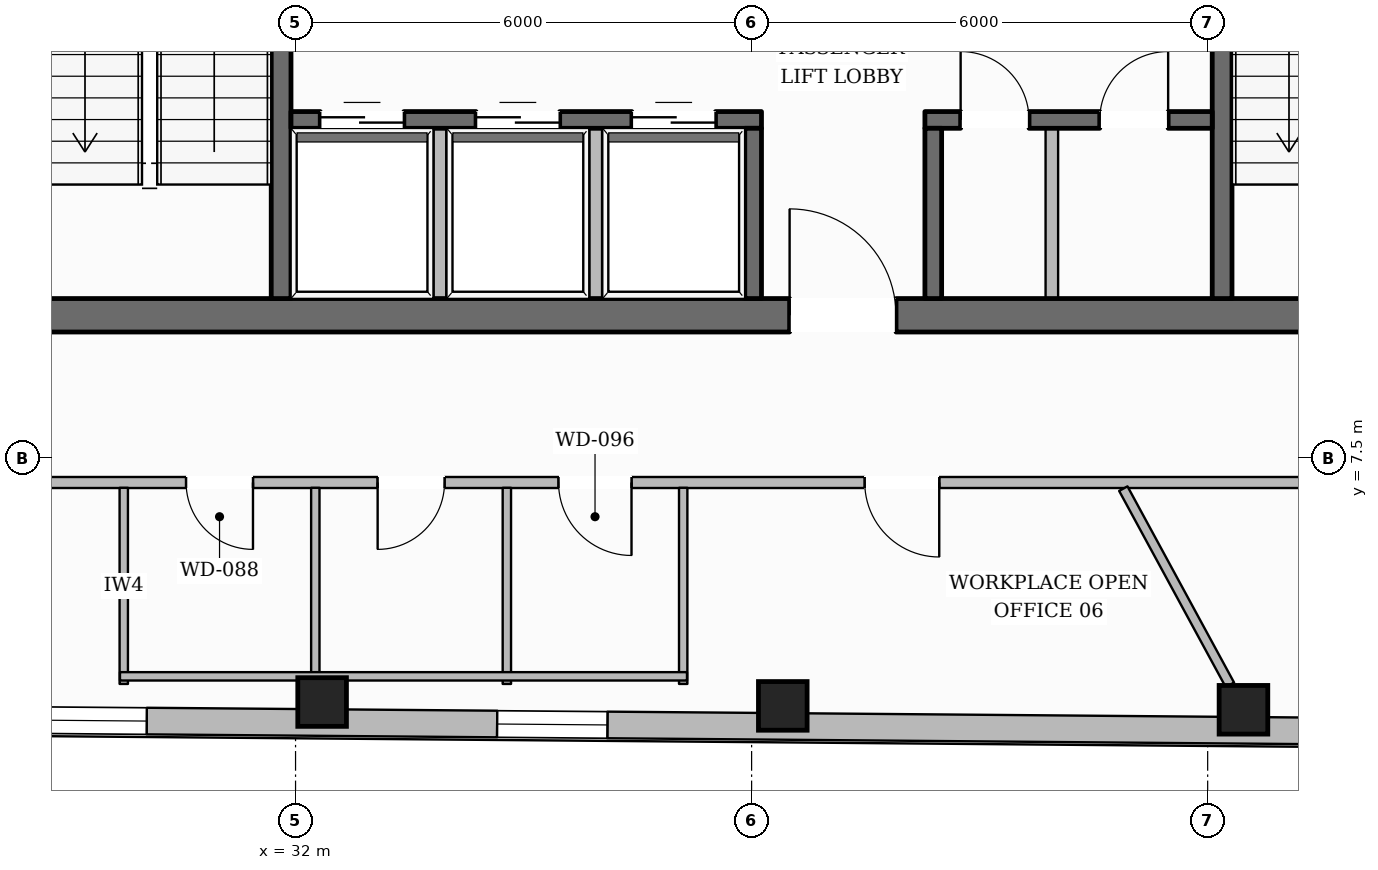
"""IFC4 building model, lengths in metres.
Left out: names, types, materials, properties, quantities, classifications, styles, units other than length and angle.
Written with IfcOpenShell. Run it as: python <this file> out.ifc"""

import sys

from ifc_helpers import new_model, si_unit, direction, frame, frame_2d, origin, origin_2d, place, context, subcontext, project, spatial, rectangle, hollow_rectangle, extrude, element, fill, save


model = new_model("IFC4")
c1 = context("Model", 3, precision=1e-05, world=origin(), true_north=direction((0.0, 1.0)))
c2 = subcontext(c1, "Body", "Model", "MODEL_VIEW")
j1 = project(units=[si_unit("LENGTHUNIT", "METRE"), si_unit("PLANEANGLEUNIT", "RADIAN")], contexts=[c1])
p1 = place(None, origin())
s1 = spatial("IfcSite", under=j1, at=p1, CompositionType="ELEMENT")
p2 = place(p1, origin())
s2 = spatial("IfcBuilding", under=s1, at=p2, CompositionType="ELEMENT")
p3 = place(p2, frame((0.0, 0.0, 176.55)))
s3 = spatial("IfcBuildingStorey", under=s2, at=p3, CompositionType="ELEMENT", Elevation=176.55)
p4 = place(p3, frame((28.04, 9.38, 0.0), z_axis=(0.0, 0.0, 1.0), x_axis=(1.0, 0.0, 0.0)))
e1 = element("IfcWall", 1, at=p4, inside=s3, PredefinedType="SOLIDWALL", context=c2, shape_type="SweptSolid", body=[
    extrude(rectangle(XDim=19.92, YDim=0.44, at=frame_2d((9.96, 0.0))), origin(), (0.0, 0.0, 1.0), 3.6),
])
p5 = place(p4, frame((10.46, 0.0, 0.0)))
e2 = element("IfcOpeningElement", 2, at=p5, cuts=e1, PredefinedType="OPENING", context=c2, shape_type="SweptSolid", body=[
    extrude(rectangle(XDim=1.4, YDim=2.2, at=frame_2d((0.7, 1.1))), frame((0.0, 0.23, 0.0), z_axis=(0.0, -1.0, 0.0), x_axis=(1.0, 0.0, 0.0)), (0.0, 0.0, 1.0), 0.46),
])
p6 = place(p3, frame((31.81, 9.6, 0.0), z_axis=(0.0, 0.0, 1.0), x_axis=(0.0, 1.0, 0.0)))
e3 = element("IfcWall", 3, at=p6, inside=s3, PredefinedType="SHEAR", context=c2, shape_type="SweptSolid", body=[
    extrude(rectangle(XDim=13.0, YDim=0.26, at=frame_2d((6.5, 0.0))), origin(), (0.0, 0.0, 1.0), 3.6),
])
p7 = place(p6, frame((10.925, 0.0, 0.0)))
e4 = element("IfcOpeningElement", 4, at=p7, cuts=e3, PredefinedType="OPENING", context=c2, shape_type="SweptSolid", body=[
    extrude(rectangle(XDim=1.25, YDim=2.25, at=frame_2d((0.625, 1.125))), frame((0.0, 0.14, 0.0), z_axis=(0.0, -1.0, 0.0), x_axis=(1.0, 0.0, 0.0)), (0.0, 0.0, 1.0), 0.28),
])
p8 = place(p3, frame((44.19, 9.6, 0.0), z_axis=(0.0, 0.0, 1.0), x_axis=(0.0, 1.0, 0.0)))
e5 = element("IfcWall", 5, at=p8, inside=s3, PredefinedType="SHEAR", context=c2, shape_type="SweptSolid", body=[
    extrude(rectangle(XDim=13.0, YDim=0.26, at=frame_2d((6.5, 0.0))), origin(), (0.0, 0.0, 1.0), 3.6),
])
p9 = place(p8, frame((10.925, 0.0, 0.0)))
e6 = element("IfcOpeningElement", 6, at=p9, cuts=e5, PredefinedType="OPENING", context=c2, shape_type="SweptSolid", body=[
    extrude(rectangle(XDim=1.25, YDim=2.25, at=frame_2d((0.625, 1.125))), frame((0.0, 0.14, 0.0), z_axis=(0.0, -1.0, 0.0), x_axis=(1.0, 0.0, 0.0)), (0.0, 0.0, 1.0), 0.28),
])
p10 = place(p3, frame((31.94, 11.95, 0.0), z_axis=(0.0, 0.0, 1.0), x_axis=(1.0, 0.0, 0.0)))
e7 = element("IfcWall", 7, at=p10, inside=s3, PredefinedType="SOLIDWALL", context=c2, shape_type="SweptSolid", body=[
    extrude(rectangle(XDim=6.19, YDim=0.22, at=frame_2d((3.095, 0.0))), origin(), (0.0, 0.0, 1.0), 3.6),
])
p11 = place(p10, frame((0.385, 0.0, 0.0)))
e8 = element("IfcOpeningElement", 8, at=p11, cuts=e7, PredefinedType="OPENING", context=c2, shape_type="SweptSolid", body=[
    extrude(rectangle(XDim=1.1, YDim=2.2, at=frame_2d((0.55, 1.1))), frame((0.0, 0.12, 0.0), z_axis=(0.0, -1.0, 0.0), x_axis=(1.0, 0.0, 0.0)), (0.0, 0.0, 1.0), 0.24),
])
p12 = place(p10, frame((2.435, 0.0, 0.0)))
e9 = element("IfcOpeningElement", 9, at=p12, cuts=e7, PredefinedType="OPENING", context=c2, shape_type="SweptSolid", body=[
    extrude(rectangle(XDim=1.1, YDim=2.2, at=frame_2d((0.55, 1.1))), frame((0.0, 0.12, 0.0), z_axis=(0.0, -1.0, 0.0), x_axis=(1.0, 0.0, 0.0)), (0.0, 0.0, 1.0), 0.24),
])
p13 = place(p10, frame((4.485, 0.0, 0.0)))
e10 = element("IfcOpeningElement", 10, at=p13, cuts=e7, PredefinedType="OPENING", context=c2, shape_type="SweptSolid", body=[
    extrude(rectangle(XDim=1.1, YDim=2.2, at=frame_2d((0.55, 1.1))), frame((0.0, 0.12, 0.0), z_axis=(0.0, -1.0, 0.0), x_axis=(1.0, 0.0, 0.0)), (0.0, 0.0, 1.0), 0.24),
])
p14 = place(p3, frame((40.28, 11.95, 0.0), z_axis=(0.0, 0.0, 1.0), x_axis=(1.0, 0.0, 0.0)))
e11 = element("IfcWall", 11, at=p14, inside=s3, PredefinedType="SOLIDWALL", context=c2, shape_type="SweptSolid", body=[
    extrude(rectangle(XDim=3.78, YDim=0.22, at=frame_2d((1.89, 0.0))), origin(), (0.0, 0.0, 1.0), 3.6),
])
p15 = place(p14, frame((0.47, 0.0, 0.0)))
e12 = element("IfcOpeningElement", 12, at=p15, cuts=e11, PredefinedType="OPENING", context=c2, shape_type="SweptSolid", body=[
    extrude(rectangle(XDim=0.9, YDim=2.1, at=frame_2d((0.45, 1.05))), frame((0.0, 0.12, 0.0), z_axis=(0.0, -1.0, 0.0), x_axis=(1.0, 0.0, 0.0)), (0.0, 0.0, 1.0), 0.24),
])
p16 = place(p14, frame((2.3, 0.0, 0.0)))
e13 = element("IfcOpeningElement", 13, at=p16, cuts=e11, PredefinedType="OPENING", context=c2, shape_type="SweptSolid", body=[
    extrude(rectangle(XDim=0.9, YDim=2.1, at=frame_2d((0.45, 1.05))), frame((0.0, 0.12, 0.0), z_axis=(0.0, -1.0, 0.0), x_axis=(1.0, 0.0, 0.0)), (0.0, 0.0, 1.0), 0.24),
])
for number, where, z_axis, x_axis in (
    (14, (38.02, 9.6, 0.0), (0.0, 0.0, 1.0), (0.0, 1.0, 0.0)),
    (15, (40.39, 9.6, 0.0), (0.0, 0.0, 1.0), (0.0, 1.0, 0.0)),
):
    element("IfcWall", number, at=place(p3, frame(where, z_axis=z_axis, x_axis=x_axis)), inside=s3, PredefinedType="SOLIDWALL", context=c2, shape_type="SweptSolid", body=[
        extrude(rectangle(XDim=2.24, YDim=0.22, at=frame_2d((1.12, 0.0))), origin(), (0.0, 0.0, 1.0), 3.6),
    ])
for number, where, z_axis, x_axis in (
    (16, (32.35, 4.292, 0.0), (0.0, 0.0, 1.0), (1.0, 0.0, 0.0)),
    (17, (38.41, 4.241, 0.0), (0.0, 0.0, 1.0), (1.0, 0.0, 0.0)),
    (18, (44.471, 4.19, 0.0), (0.0, 0.0, 1.0), (1.0, 0.0, 0.0)),
):
    element("IfcColumn", number, at=place(p3, frame(where, z_axis=z_axis, x_axis=x_axis)), inside=s3, PredefinedType="COLUMN", context=c2, shape_type="SweptSolid", body=[
        extrude(hollow_rectangle(XDim=0.64, YDim=0.64, WallThickness=0.028, at=origin_2d()), origin(), (0.0, 0.0, 1.0), 3.6),
    ])
p17 = place(p3, frame((15.13, 12.109, 0.0), z_axis=(0.0, 0.0, 1.0), x_axis=(0.493717133856, 0.869622557054, 0.0)))
e19 = element("IfcWall", 19, at=p17, inside=s3, PredefinedType="STANDARD", context=c2, shape_type="SweptSolid", body=[
    extrude(rectangle(XDim=37.245, YDim=0.35, at=frame_2d((18.623, 0.0))), origin(), (0.0, 0.0, 1.0), 3.132),
])
p18 = place(p17, frame((27.334, 0.0, 0.0)))
e20 = element("IfcOpeningElement", 20, at=p18, cuts=e19, PredefinedType="OPENING", context=c2, shape_type="SweptSolid", body=[
    extrude(rectangle(XDim=1.0, YDim=2.2, at=frame_2d((0.5, 1.1))), frame((0.0, 0.185, 0.0), z_axis=(0.0, -1.0, 0.0), x_axis=(1.0, 0.0, 0.0)), (0.0, 0.0, 1.0), 0.37),
])
p19 = place(p17, frame((33.014, 0.0, 0.65)))
e21 = element("IfcOpeningElement", 21, at=p19, cuts=e19, PredefinedType="OPENING", context=c2, shape_type="SweptSolid", body=[
    extrude(rectangle(XDim=1.45, YDim=1.75, at=frame_2d((0.725, 0.875))), frame((0.0, 0.185, 0.0), z_axis=(0.0, -1.0, 0.0), x_axis=(1.0, 0.0, 0.0)), (0.0, 0.0, 1.0), 0.37),
])
p20 = place(p17, frame((20.918, 0.0, 0.65)))
e22 = element("IfcOpeningElement", 22, at=p20, cuts=e19, PredefinedType="OPENING", context=c2, shape_type="SweptSolid", body=[
    extrude(rectangle(XDim=1.45, YDim=1.75, at=frame_2d((0.725, 0.875))), frame((0.0, 0.185, 0.0), z_axis=(0.0, -1.0, 0.0), x_axis=(1.0, 0.0, 0.0)), (0.0, 0.0, 1.0), 0.37),
])
p21 = place(p17, frame((8.822, 0.0, 0.65)))
e23 = element("IfcOpeningElement", 23, at=p21, cuts=e19, PredefinedType="OPENING", context=c2, shape_type="SweptSolid", body=[
    extrude(rectangle(XDim=1.45, YDim=1.75, at=frame_2d((0.725, 0.875))), frame((0.0, 0.185, 0.0), z_axis=(0.0, -1.0, 0.0), x_axis=(1.0, 0.0, 0.0)), (0.0, 0.0, 1.0), 0.37),
])
p22 = place(p17, frame((2.774, 0.0, 0.65)))
e24 = element("IfcOpeningElement", 24, at=p22, cuts=e19, PredefinedType="OPENING", context=c2, shape_type="SweptSolid", body=[
    extrude(rectangle(XDim=1.45, YDim=1.75, at=frame_2d((0.725, 0.875))), frame((0.0, 0.185, 0.0), z_axis=(0.0, -1.0, 0.0), x_axis=(1.0, 0.0, 0.0)), (0.0, 0.0, 1.0), 0.37),
])
p23 = place(p3, frame((57.072, 3.814, 0.0), z_axis=(0.0, 0.0, 1.0), x_axis=(-0.999964560475, 0.008418895034, 0.0)))
e25 = element("IfcWall", 25, at=p23, inside=s3, PredefinedType="STANDARD", context=c2, shape_type="SweptSolid", body=[
    extrude(rectangle(XDim=37.322, YDim=0.35, at=frame_2d((18.661, 0.0))), origin(), (0.0, 0.0, 1.0), 3.132),
])
p24 = place(p23, frame((33.092, 0.0, 0.65)))
e26 = element("IfcOpeningElement", 26, at=p24, cuts=e25, PredefinedType="OPENING", context=c2, shape_type="SweptSolid", body=[
    extrude(rectangle(XDim=1.45, YDim=1.75, at=frame_2d((0.725, 0.875))), frame((0.0, 0.185, 0.0), z_axis=(0.0, -1.0, 0.0), x_axis=(1.0, 0.0, 0.0)), (0.0, 0.0, 1.0), 0.37),
])
p25 = place(p23, frame((27.031, 0.0, 0.65)))
e27 = element("IfcOpeningElement", 27, at=p25, cuts=e25, PredefinedType="OPENING", context=c2, shape_type="SweptSolid", body=[
    extrude(rectangle(XDim=1.45, YDim=1.75, at=frame_2d((0.725, 0.875))), frame((0.0, 0.185, 0.0), z_axis=(0.0, -1.0, 0.0), x_axis=(1.0, 0.0, 0.0)), (0.0, 0.0, 1.0), 0.37),
])
p26 = place(p23, frame((20.97, 0.0, 0.65)))
e28 = element("IfcOpeningElement", 28, at=p26, cuts=e25, PredefinedType="OPENING", context=c2, shape_type="SweptSolid", body=[
    extrude(rectangle(XDim=1.45, YDim=1.75, at=frame_2d((0.725, 0.875))), frame((0.0, 0.185, 0.0), z_axis=(0.0, -1.0, 0.0), x_axis=(1.0, 0.0, 0.0)), (0.0, 0.0, 1.0), 0.37),
])
p27 = place(p23, frame((8.849, 0.0, 0.65)))
e29 = element("IfcOpeningElement", 29, at=p27, cuts=e25, PredefinedType="OPENING", context=c2, shape_type="SweptSolid", body=[
    extrude(rectangle(XDim=1.45, YDim=1.75, at=frame_2d((0.725, 0.875))), frame((0.0, 0.185, 0.0), z_axis=(0.0, -1.0, 0.0), x_axis=(1.0, 0.0, 0.0)), (0.0, 0.0, 1.0), 0.37),
])
p28 = place(p23, frame((2.788, 0.0, 0.65)))
e30 = element("IfcOpeningElement", 30, at=p28, cuts=e25, PredefinedType="OPENING", context=c2, shape_type="SweptSolid", body=[
    extrude(rectangle(XDim=1.45, YDim=1.75, at=frame_2d((0.725, 0.875))), frame((0.0, 0.185, 0.0), z_axis=(0.0, -1.0, 0.0), x_axis=(1.0, 0.0, 0.0)), (0.0, 0.0, 1.0), 0.37),
])
p29 = place(p3, frame((42.622, 44.415, 0.0), z_axis=(0.0, 0.0, 1.0), x_axis=(0.501018185811, -0.865436755336, 0.0)))
e31 = element("IfcWall", 31, at=p29, inside=s3, PredefinedType="STANDARD", context=c2, shape_type="SweptSolid", body=[
    extrude(rectangle(XDim=37.783, YDim=0.35, at=frame_2d((18.892, 0.0))), origin(), (0.0, 0.0, 1.0), 3.132),
])
p30 = place(p29, frame((27.737, 0.0, 0.0)))
e32 = element("IfcOpeningElement", 32, at=p30, cuts=e31, PredefinedType="OPENING", context=c2, shape_type="SweptSolid", body=[
    extrude(rectangle(XDim=1.0, YDim=2.2, at=frame_2d((0.5, 1.1))), frame((0.0, 0.185, 0.0), z_axis=(0.0, -1.0, 0.0), x_axis=(1.0, 0.0, 0.0)), (0.0, 0.0, 1.0), 0.37),
])
p31 = place(p29, frame((33.513, 0.0, 0.65)))
e33 = element("IfcOpeningElement", 33, at=p31, cuts=e31, PredefinedType="OPENING", context=c2, shape_type="SweptSolid", body=[
    extrude(rectangle(XDim=1.45, YDim=1.75, at=frame_2d((0.725, 0.875))), frame((0.0, 0.185, 0.0), z_axis=(0.0, -1.0, 0.0), x_axis=(1.0, 0.0, 0.0)), (0.0, 0.0, 1.0), 0.37),
])
p32 = place(p29, frame((21.235, 0.0, 0.65)))
e34 = element("IfcOpeningElement", 34, at=p32, cuts=e31, PredefinedType="OPENING", context=c2, shape_type="SweptSolid", body=[
    extrude(rectangle(XDim=1.45, YDim=1.75, at=frame_2d((0.725, 0.875))), frame((0.0, 0.185, 0.0), z_axis=(0.0, -1.0, 0.0), x_axis=(1.0, 0.0, 0.0)), (0.0, 0.0, 1.0), 0.37),
])
p33 = place(p29, frame((8.958, 0.0, 0.65)))
e35 = element("IfcOpeningElement", 35, at=p33, cuts=e31, PredefinedType="OPENING", context=c2, shape_type="SweptSolid", body=[
    extrude(rectangle(XDim=1.45, YDim=1.75, at=frame_2d((0.725, 0.875))), frame((0.0, 0.185, 0.0), z_axis=(0.0, -1.0, 0.0), x_axis=(1.0, 0.0, 0.0)), (0.0, 0.0, 1.0), 0.37),
])
p34 = place(p29, frame((2.819, 0.0, 0.65)))
e36 = element("IfcOpeningElement", 36, at=p34, cuts=e31, PredefinedType="OPENING", context=c2, shape_type="SweptSolid", body=[
    extrude(rectangle(XDim=1.45, YDim=1.75, at=frame_2d((0.725, 0.875))), frame((0.0, 0.185, 0.0), z_axis=(0.0, -1.0, 0.0), x_axis=(1.0, 0.0, 0.0)), (0.0, 0.0, 1.0), 0.37),
])
for number, where, z_axis, x_axis in (
    (37, (33.9, 9.52, 0.0), (0.0, 0.0, 1.0), (0.0, 1.0, 0.0)),
    (38, (35.95, 9.52, 0.0), (0.0, 0.0, 1.0), (0.0, 1.0, 0.0)),
    (39, (41.95, 9.52, 0.0), (0.0, 0.0, 1.0), (0.0, 1.0, 0.0)),
):
    element("IfcWall", number, at=place(p3, frame(where, z_axis=z_axis, x_axis=x_axis)), inside=s3, PredefinedType="PARTITIONING", context=c2, shape_type="SweptSolid", body=[
        extrude(rectangle(XDim=2.32, YDim=0.165, at=frame_2d((1.16, 0.0))), origin(), (0.0, 0.0, 1.0), 3.6),
    ])
p35 = place(p3, frame((49.94, 7.18, 0.0), z_axis=(0.0, 0.0, 1.0), x_axis=(-1.0, 0.0, 0.0)))
e40 = element("IfcWall", 40, at=p35, inside=s3, PredefinedType="PARTITIONING", context=c2, shape_type="SweptSolid", body=[
    extrude(rectangle(XDim=23.88, YDim=0.145, at=frame_2d((11.94, 0.0))), origin(), (0.0, 0.0, 1.0), 3.6),
])
p36 = place(p35, frame((18.5, 0.0, 0.0)))
e41 = element("IfcOpeningElement", 41, at=p36, cuts=e40, PredefinedType="OPENING", context=c2, shape_type="SweptSolid", body=[
    extrude(rectangle(XDim=0.88, YDim=2.1, at=frame_2d((0.44, 1.05))), frame((0.0, 0.083, 0.0), z_axis=(0.0, -1.0, 0.0), x_axis=(1.0, 0.0, 0.0)), (0.0, 0.0, 1.0), 0.165),
])
p37 = place(p35, frame((15.98, 0.0, 0.0)))
e42 = element("IfcOpeningElement", 42, at=p37, cuts=e40, PredefinedType="OPENING", context=c2, shape_type="SweptSolid", body=[
    extrude(rectangle(XDim=0.88, YDim=2.1, at=frame_2d((0.44, 1.05))), frame((0.0, 0.083, 0.0), z_axis=(0.0, -1.0, 0.0), x_axis=(1.0, 0.0, 0.0)), (0.0, 0.0, 1.0), 0.165),
])
p38 = place(p35, frame((13.52, 0.0, 0.0)))
e43 = element("IfcOpeningElement", 43, at=p38, cuts=e40, PredefinedType="OPENING", context=c2, shape_type="SweptSolid", body=[
    extrude(rectangle(XDim=0.96, YDim=2.1, at=frame_2d((0.48, 1.05))), frame((0.0, 0.083, 0.0), z_axis=(0.0, -1.0, 0.0), x_axis=(1.0, 0.0, 0.0)), (0.0, 0.0, 1.0), 0.165),
])
p39 = place(p35, frame((21.459, 0.0, 0.0)))
e44 = element("IfcOpeningElement", 44, at=p39, cuts=e40, PredefinedType="OPENING", context=c2, shape_type="SweptSolid", body=[
    extrude(rectangle(XDim=0.98, YDim=2.15, at=frame_2d((0.49, 1.075))), frame((0.0, 0.083, 0.0), z_axis=(0.0, -1.0, 0.0), x_axis=(1.0, 0.0, 0.0)), (0.0, 0.0, 1.0), 0.165),
])
p40 = place(p35, frame((9.471, 0.0, 0.0)))
e45 = element("IfcOpeningElement", 45, at=p40, cuts=e40, PredefinedType="OPENING", context=c2, shape_type="SweptSolid", body=[
    extrude(rectangle(XDim=0.98, YDim=2.15, at=frame_2d((0.49, 1.075))), frame((0.0, 0.083, 0.0), z_axis=(0.0, -1.0, 0.0), x_axis=(1.0, 0.0, 0.0)), (0.0, 0.0, 1.0), 0.165),
])
p41 = place(p3, frame((29.74, 4.53, 0.0), z_axis=(0.0, 0.0, 1.0), x_axis=(0.0, 1.0, 0.0)))
e46 = element("IfcWall", 46, at=p41, inside=s3, PredefinedType="PLUMBINGWALL", context=c2, shape_type="SweptSolid", body=[
    extrude(rectangle(XDim=2.58, YDim=0.11, at=frame_2d((1.29, 0.0))), origin(), (0.0, 0.0, 1.0), 3.6),
])
p42 = place(p3, frame((32.26, 4.53, 0.0), z_axis=(0.0, 0.0, 1.0), x_axis=(0.0, 1.0, 0.0)))
e47 = element("IfcWall", 47, at=p42, inside=s3, PredefinedType="PLUMBINGWALL", context=c2, shape_type="SweptSolid", body=[
    extrude(rectangle(XDim=2.58, YDim=0.11, at=frame_2d((1.29, 0.0))), origin(), (0.0, 0.0, 1.0), 3.141),
])
for number, where, z_axis, x_axis in (
    (48, (34.78, 4.53, 0.0), (0.0, 0.0, 1.0), (0.0, 1.0, 0.0)),
    (49, (37.1, 4.53, 0.0), (0.0, 0.0, 1.0), (0.0, 1.0, 0.0)),
):
    element("IfcWall", number, at=place(p3, frame(where, z_axis=z_axis, x_axis=x_axis)), inside=s3, PredefinedType="PLUMBINGWALL", context=c2, shape_type="SweptSolid", body=[
        extrude(rectangle(XDim=2.58, YDim=0.11, at=frame_2d((1.29, 0.0))), origin(), (0.0, 0.0, 1.0), 3.6),
    ])
p43 = place(p3, frame((29.69, 4.63, 0.0), z_axis=(0.0, 0.0, 1.0), x_axis=(1.0, 0.0, 0.0)))
e50 = element("IfcWall", 50, at=p43, inside=s3, PredefinedType="PLUMBINGWALL", context=c2, shape_type="SweptSolid", body=[
    extrude(rectangle(XDim=7.46, YDim=0.11, at=frame_2d((3.73, 0.0))), origin(), (0.0, 0.0, 1.0), 3.6),
])
p44 = place(p3, frame((42.89, 7.1, 0.0), z_axis=(0.0, 0.0, 1.0), x_axis=(0.47740175034, -0.87868513631, 0.0)))
e51 = element("IfcWall", 51, at=p44, inside=s3, PredefinedType="PARTITIONING", context=c2, shape_type="SweptSolid", body=[
    extrude(rectangle(XDim=2.938, YDim=0.125, at=frame_2d((1.469, 0.0))), origin(), (0.0, 0.0, 1.0), 3.6),
])
p45 = place(p25, origin())
e52 = element("IfcWindow", 52, at=p45, inside=s3, PartitioningType="SINGLE_PANEL", PredefinedType="WINDOW", context=c2, shape_type="SweptSolid", body=[
    extrude(rectangle(XDim=1.45, YDim=1.75, at=frame_2d((0.725, 0.875))), frame((0.0, 0.03, 0.0), z_axis=(0.0, -1.0, 0.0), x_axis=(1.0, 0.0, 0.0)), (0.0, 0.0, 1.0), 0.06),
])
fill(e27, e52)
p46 = place(p26, origin())
e53 = element("IfcWindow", 53, at=p46, inside=s3, PartitioningType="SINGLE_PANEL", PredefinedType="WINDOW", context=c2, shape_type="SweptSolid", body=[
    extrude(rectangle(XDim=1.45, YDim=1.75, at=frame_2d((0.725, 0.875))), frame((0.0, 0.03, 0.0), z_axis=(0.0, -1.0, 0.0), x_axis=(1.0, 0.0, 0.0)), (0.0, 0.0, 1.0), 0.06),
])
fill(e28, e53)
p47 = place(p5, origin())
e54 = element("IfcDoor", 54, at=p47, inside=s3, OperationType="SINGLE_SWING_LEFT", PredefinedType="DOOR", context=c2, shape_type="SweptSolid", body=[
    extrude(rectangle(XDim=1.4, YDim=2.2, at=frame_2d((0.7, 1.1))), frame((0.0, 0.025, 0.0), z_axis=(0.0, -1.0, 0.0), x_axis=(1.0, 0.0, 0.0)), (0.0, 0.0, 1.0), 0.05),
])
fill(e2, e54)
p48 = place(p11, origin())
e55 = element("IfcDoor", 55, at=p48, inside=s3, OperationType="DOUBLE_DOOR_SLIDING", PredefinedType="DOOR", context=c2, shape_type="SweptSolid", body=[
    extrude(rectangle(XDim=1.1, YDim=2.2, at=frame_2d((0.55, 1.1))), frame((0.0, 0.025, 0.0), z_axis=(0.0, -1.0, 0.0), x_axis=(1.0, 0.0, 0.0)), (0.0, 0.0, 1.0), 0.05),
])
fill(e8, e55)
p49 = place(p12, origin())
e56 = element("IfcDoor", 56, at=p49, inside=s3, OperationType="DOUBLE_DOOR_SLIDING", PredefinedType="DOOR", context=c2, shape_type="SweptSolid", body=[
    extrude(rectangle(XDim=1.1, YDim=2.2, at=frame_2d((0.55, 1.1))), frame((0.0, 0.025, 0.0), z_axis=(0.0, -1.0, 0.0), x_axis=(1.0, 0.0, 0.0)), (0.0, 0.0, 1.0), 0.05),
])
fill(e9, e56)
p50 = place(p13, origin())
e57 = element("IfcDoor", 57, at=p50, inside=s3, OperationType="DOUBLE_DOOR_SLIDING", PredefinedType="DOOR", context=c2, shape_type="SweptSolid", body=[
    extrude(rectangle(XDim=1.1, YDim=2.2, at=frame_2d((0.55, 1.1))), frame((0.0, 0.025, 0.0), z_axis=(0.0, -1.0, 0.0), x_axis=(1.0, 0.0, 0.0)), (0.0, 0.0, 1.0), 0.05),
])
fill(e10, e57)
p51 = place(p15, origin())
e58 = element("IfcDoor", 58, at=p51, inside=s3, OperationType="SINGLE_SWING_LEFT", PredefinedType="DOOR", context=c2, shape_type="SweptSolid", body=[
    extrude(rectangle(XDim=0.9, YDim=2.1, at=frame_2d((0.45, 1.05))), frame((0.0, 0.025, 0.0), z_axis=(0.0, -1.0, 0.0), x_axis=(1.0, 0.0, 0.0)), (0.0, 0.0, 1.0), 0.05),
])
fill(e12, e58)
p52 = place(p16, origin())
e59 = element("IfcDoor", 59, at=p52, inside=s3, OperationType="SINGLE_SWING_RIGHT", PredefinedType="DOOR", context=c2, shape_type="SweptSolid", body=[
    extrude(rectangle(XDim=0.9, YDim=2.1, at=frame_2d((0.45, 1.05))), frame((0.0, 0.025, 0.0), z_axis=(0.0, -1.0, 0.0), x_axis=(1.0, 0.0, 0.0)), (0.0, 0.0, 1.0), 0.05),
])
fill(e13, e59)
p53 = place(p36, origin())
e60 = element("IfcDoor", 60, at=p53, inside=s3, OperationType="SINGLE_SWING_LEFT", PredefinedType="DOOR", context=c2, shape_type="SweptSolid", body=[
    extrude(rectangle(XDim=0.88, YDim=2.1, at=frame_2d((0.44, 1.05))), frame((0.0, 0.025, 0.0), z_axis=(0.0, -1.0, 0.0), x_axis=(1.0, 0.0, 0.0)), (0.0, 0.0, 1.0), 0.05),
])
fill(e41, e60)
p54 = place(p37, origin())
e61 = element("IfcDoor", 61, at=p54, inside=s3, OperationType="SINGLE_SWING_RIGHT", PredefinedType="DOOR", context=c2, shape_type="SweptSolid", body=[
    extrude(rectangle(XDim=0.88, YDim=2.1, at=frame_2d((0.44, 1.05))), frame((0.0, 0.025, 0.0), z_axis=(0.0, -1.0, 0.0), x_axis=(1.0, 0.0, 0.0)), (0.0, 0.0, 1.0), 0.05),
])
fill(e42, e61)
p55 = place(p38, origin())
e62 = element("IfcDoor", 62, at=p55, inside=s3, OperationType="SINGLE_SWING_LEFT", PredefinedType="DOOR", context=c2, shape_type="SweptSolid", body=[
    extrude(rectangle(XDim=0.96, YDim=2.1, at=frame_2d((0.48, 1.05))), frame((0.0, 0.025, 0.0), z_axis=(0.0, -1.0, 0.0), x_axis=(1.0, 0.0, 0.0)), (0.0, 0.0, 1.0), 0.05),
])
fill(e43, e62)
p56 = place(p40, origin())
e63 = element("IfcDoor", 63, at=p56, inside=s3, OperationType="SINGLE_SWING_LEFT", PredefinedType="DOOR", context=c2, shape_type="SweptSolid", body=[
    extrude(rectangle(XDim=0.98, YDim=2.15, at=frame_2d((0.49, 1.075))), frame((0.0, 0.025, 0.0), z_axis=(0.0, -1.0, 0.0), x_axis=(1.0, 0.0, 0.0)), (0.0, 0.0, 1.0), 0.05),
])
fill(e45, e63)
save(model, sys.argv[1])
